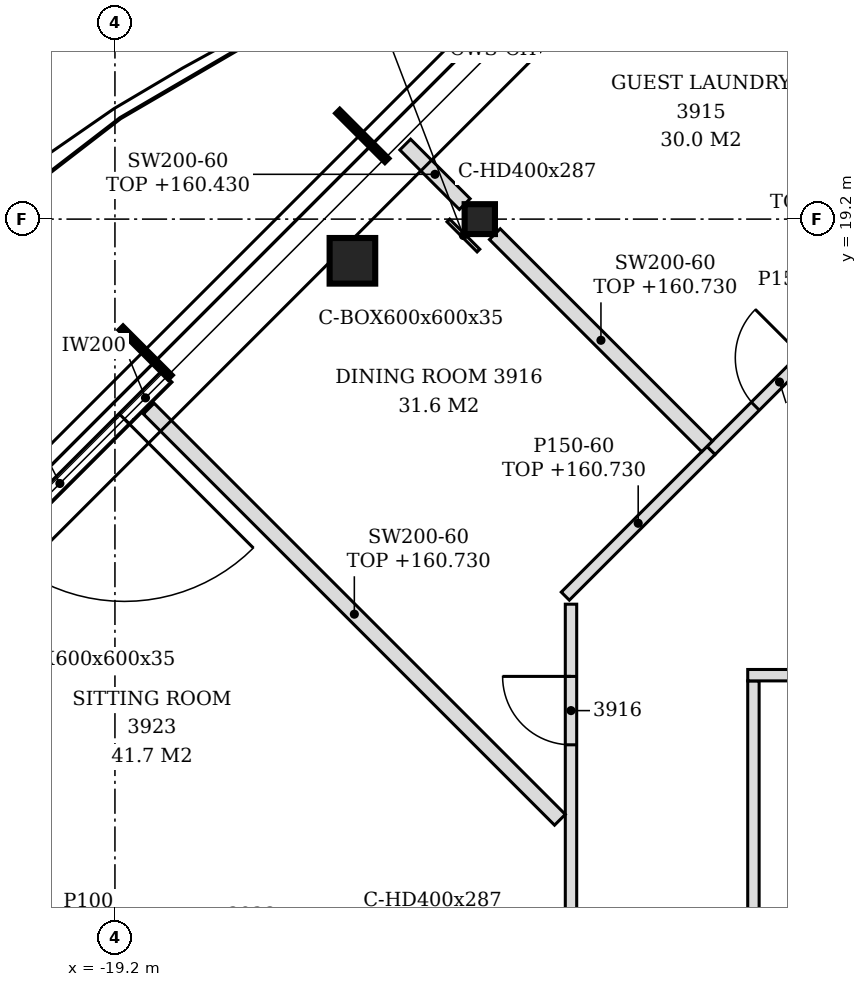
"""IFC4 building model, lengths in metres.
Left out: names, types, materials, properties, quantities, classifications, styles, units other than length and angle.
Written with IfcOpenShell. Run it as: python <this file> out.ifc"""

import sys

from ifc_helpers import new_model, si_unit, direction, frame, frame_2d, origin, origin_2d, place, context, subcontext, project, spatial, polyline, rectangle, hollow_rectangle, i_section, outline, extrude, element, fill, save


model = new_model("IFC4")
c1 = context("Model", 3, precision=1e-05, world=origin(), true_north=direction((0.0, 1.0)))
c2 = subcontext(c1, "Body", "Model", "MODEL_VIEW")
j1 = project(units=[si_unit("LENGTHUNIT", "METRE"), si_unit("PLANEANGLEUNIT", "RADIAN")], contexts=[c1])
p1 = place(None, origin())
s1 = spatial("IfcSite", under=j1, at=p1, CompositionType="ELEMENT")
p2 = place(p1, origin())
s2 = spatial("IfcBuilding", under=s1, at=p2, CompositionType="ELEMENT")
p3 = place(p2, frame((0.0, 0.0, 157.8)))
s3 = spatial("IfcBuildingStorey", under=s2, at=p3, CompositionType="ELEMENT", Elevation=157.8)
p4 = place(p3, frame((-16.076, 18.652, -0.15), z_axis=(0.0, 0.0, 1.0), x_axis=(1.0, 0.0, 0.0)))
e1 = element("IfcColumn", 1, at=p4, inside=s3, PredefinedType="COLUMN", context=c2, shape_type="SweptSolid", body=[
    extrude(hollow_rectangle(XDim=0.6, YDim=0.6, WallThickness=0.035, at=origin_2d()), origin(), (0.0, 0.0, 1.0), 3.6),
])
p5 = place(p3, frame((-14.4, 19.2, -0.15), z_axis=(0.0, 0.0, 1.0), x_axis=(1.0, 0.0, 0.0)))
e2 = element("IfcColumn", 2, at=p5, inside=s3, PredefinedType="COLUMN", context=c2, shape_type="SweptSolid", body=[
    extrude(i_section(OverallWidth=0.399, OverallDepth=0.393, WebThickness=0.023, FlangeThickness=0.037, FilletRadius=0.015, at=origin_2d()), origin(), (0.0, 0.0, 1.0), 3.6),
])
p6 = place(p3, frame((-18.521, 17.126, 0.0), z_axis=(0.0, 0.0, 1.0), x_axis=(-0.707106781187, -0.707106781187, 0.0)))
e3 = element("IfcWall", 3, at=p6, inside=s3, PredefinedType="NOTDEFINED", context=c2, shape_type="SweptSolid", body=[
    extrude(rectangle(XDim=3.962, YDim=0.2, at=frame_2d((1.981, 0.0))), origin(), (0.0, 0.0, 1.0), 3.45),
])
p7 = place(p6, frame((0.785, 0.0, 0.0)))
e4 = element("IfcOpeningElement", 4, at=p7, cuts=e3, PredefinedType="OPENING", context=c2, shape_type="SweptSolid", body=[
    extrude(rectangle(XDim=2.4, YDim=2.4, at=frame_2d((1.2, 1.2))), frame((0.0, 0.11, 0.0), z_axis=(0.0, -1.0, 0.0), x_axis=(1.0, 0.0, 0.0)), (0.0, 0.0, 1.0), 0.22),
])
p8 = place(p3, frame((-13.2, -3.5, 0.0), z_axis=(0.0, 0.0, 1.0), x_axis=(0.0, 1.0, 0.0)))
e5 = element("IfcWall", 5, at=p8, inside=s3, PredefinedType="PARTITIONING", context=c2, shape_type="SweptSolid", body=[
    extrude(outline(polyline([(0.0, 0.0), (17.634, 0.0), (17.634, 3.45), (13.2, 3.45), (13.198, 2.93), (13.0, 2.93), (12.998, 3.45), (8.4, 3.45), (8.398, 2.93), (8.2, 2.93), (8.198, 3.45), (3.6, 3.45), (3.598, 2.93), (3.4, 2.93), (3.398, 3.45), (0.0, 3.45), (0.0, 0.0)])), frame((0.0, 0.075, 0.0), z_axis=(0.0, -1.0, 0.0), x_axis=(1.0, 0.0, 0.0)), (0.0, 0.0, 1.0), 0.15),
])
p9 = place(p8, frame((15.784, 0.0, 0.0)))
e6 = element("IfcOpeningElement", 6, at=p9, cuts=e5, PredefinedType="OPENING", context=c2, shape_type="SweptSolid", body=[
    extrude(rectangle(XDim=0.9, YDim=2.1, at=frame_2d((0.45, 1.05))), frame((0.0, 0.085, 0.0), z_axis=(0.0, -1.0, 0.0), x_axis=(1.0, 0.0, 0.0)), (0.0, 0.0, 1.0), 0.17),
])
p10 = place(p8, frame((11.45, 0.0, 0.0)))
e7 = element("IfcOpeningElement", 7, at=p10, cuts=e5, PredefinedType="OPENING", context=c2, shape_type="SweptSolid", body=[
    extrude(rectangle(XDim=0.9, YDim=2.1, at=frame_2d((0.45, 1.05))), frame((0.0, 0.085, 0.0), z_axis=(0.0, -1.0, 0.0), x_axis=(1.0, 0.0, 0.0)), (0.0, 0.0, 1.0), 0.17),
])
p11 = place(p8, frame((4.25, 0.0, 0.0)))
e8 = element("IfcOpeningElement", 8, at=p11, cuts=e5, PredefinedType="OPENING", context=c2, shape_type="SweptSolid", body=[
    extrude(rectangle(XDim=0.9, YDim=2.1, at=frame_2d((0.45, 1.05))), frame((0.0, 0.085, 0.0), z_axis=(0.0, -1.0, 0.0), x_axis=(1.0, 0.0, 0.0)), (0.0, 0.0, 1.0), 0.17),
])
p12 = place(p8, frame((1.353, 0.0, 0.0)))
e9 = element("IfcOpeningElement", 9, at=p12, cuts=e5, PredefinedType="OPENING", context=c2, shape_type="SweptSolid", body=[
    extrude(rectangle(XDim=0.9, YDim=2.1, at=frame_2d((0.45, 1.05))), frame((0.0, 0.085, 0.0), z_axis=(0.0, -1.0, 0.0), x_axis=(1.0, 0.0, 0.0)), (0.0, 0.0, 1.0), 0.17),
])
p13 = place(p3, frame((-10.8, -2.506, 0.0), z_axis=(0.0, 0.0, 1.0), x_axis=(0.0, 1.0, 0.0)))
e10 = element("IfcWall", 10, at=p13, inside=s3, PredefinedType="PARTITIONING", context=c2, shape_type="SweptSolid", body=[
    extrude(outline(polyline([(0.0, 0.0), (15.631, 0.0), (15.631, 3.45), (12.206, 3.45), (12.204, 2.93), (12.006, 2.93), (12.004, 3.45), (7.406, 3.45), (7.404, 2.93), (7.206, 2.93), (7.204, 3.45), (2.606, 3.45), (2.604, 2.93), (2.406, 2.93), (2.404, 3.45), (0.0, 3.45), (0.0, 0.0)])), frame((0.0, 0.075, 0.0), z_axis=(0.0, -1.0, 0.0), x_axis=(1.0, 0.0, 0.0)), (0.0, 0.0, 1.0), 0.15),
])
p14 = place(p3, frame((-13.346, 11.298, 0.0), z_axis=(0.0, 0.0, 1.0), x_axis=(-0.707106781187, 0.707106781187, 0.0)))
e11 = element("IfcWall", 11, at=p14, inside=s3, PredefinedType="PARTITIONING", context=c2, shape_type="SweptSolid", body=[
    extrude(rectangle(XDim=7.65, YDim=0.2, at=frame_2d((3.825, 0.0))), origin(), (0.0, 0.0, 1.0), 2.93),
])
p15 = place(p3, frame((-10.875, 13.2, 0.0), z_axis=(0.0, 0.0, 1.0), x_axis=(1.0, 0.0, 0.0)))
e12 = element("IfcWall", 12, at=p15, inside=s3, PredefinedType="PARTITIONING", context=c2, shape_type="SweptSolid", body=[
    extrude(rectangle(XDim=4.06, YDim=0.15, at=frame_2d((2.03, 0.0))), origin(), (0.0, 0.0, 1.0), 3.45),
])
p16 = place(p3, frame((-13.275, 14.24, 0.0), z_axis=(0.0, 0.0, 1.0), x_axis=(0.707286821097, 0.706926695424, 0.0)))
e13 = element("IfcWall", 13, at=p16, inside=s3, PredefinedType="PARTITIONING", context=c2, shape_type="SweptSolid", body=[
    extrude(rectangle(XDim=2.712, YDim=0.15, at=frame_2d((1.356, 0.0))), origin(), (0.0, 0.0, 1.0), 2.93),
])
p17 = place(p3, frame((-11.357, 16.157, 0.0), z_axis=(0.0, 0.0, 1.0), x_axis=(0.707106781187, 0.707106781187, 0.0)))
e14 = element("IfcWall", 14, at=p17, inside=s3, PredefinedType="PARTITIONING", context=c2, shape_type="SweptSolid", body=[
    extrude(rectangle(XDim=3.071, YDim=0.15, at=frame_2d((1.535, 0.0))), origin(), (0.0, 0.0, 1.0), 3.45),
])
p18 = place(p17, frame((0.823, 0.0, 0.0)))
e15 = element("IfcOpeningElement", 15, at=p18, cuts=e14, PredefinedType="OPENING", context=c2, shape_type="SweptSolid", body=[
    extrude(rectangle(XDim=0.9, YDim=2.1, at=frame_2d((0.45, 1.05))), frame((0.0, 0.085, 0.0), z_axis=(0.0, -1.0, 0.0), x_axis=(1.0, 0.0, 0.0)), (0.0, 0.0, 1.0), 0.17),
])
p19 = place(p3, frame((-11.41, 16.21, 0.0), z_axis=(0.0, 0.0, 1.0), x_axis=(-0.707106781187, 0.707106781187, 0.0)))
e16 = element("IfcWall", 16, at=p19, inside=s3, PredefinedType="PARTITIONING", context=c2, shape_type="SweptSolid", body=[
    extrude(rectangle(XDim=3.948, YDim=0.2, at=frame_2d((1.974, 0.0))), origin(), (0.0, 0.0, 1.0), 2.93),
])
p20 = place(p3, frame((-7.522, 19.346, 0.0), z_axis=(0.0, 0.0, 1.0), x_axis=(-0.707106781187, 0.707106781187, 0.0)))
e17 = element("IfcWall", 17, at=p20, inside=s3, PredefinedType="PARTITIONING", context=c2, shape_type="SweptSolid", body=[
    extrude(rectangle(XDim=5.134, YDim=0.2, at=frame_2d((2.567, 0.0))), origin(), (0.0, 0.0, 1.0), 2.93),
])
p21 = place(p3, frame((-14.598, 19.398, 0.0), z_axis=(0.0, 0.0, 1.0), x_axis=(-0.707106781187, 0.707106781187, 0.0)))
e18 = element("IfcWall", 18, at=p21, inside=s3, PredefinedType="PARTITIONING", context=c2, shape_type="SweptSolid", body=[
    extrude(rectangle(XDim=1.107, YDim=0.2, at=frame_2d((0.554, 0.0))), origin(), (0.0, 0.0, 1.0), 2.63),
])
p22 = place(p3, frame((-14.418, 18.786, 0.0), z_axis=(0.0, 0.0, 1.0), x_axis=(-0.707106781187, 0.707106781187, 0.0)))
e19 = element("IfcWall", 19, at=p22, inside=s3, PredefinedType="PARTITIONING", context=c2, shape_type="SweptSolid", body=[
    extrude(rectangle(XDim=0.56, YDim=0.05, at=frame_2d((0.28, 0.0))), origin(), (0.0, 0.0, 1.0), 2.93),
])
p23 = place(p7, origin())
e20 = element("IfcDoor", 20, at=p23, inside=s3, OperationType="SINGLE_SWING_LEFT", PredefinedType="DOOR", context=c2, shape_type="SweptSolid", body=[
    extrude(rectangle(XDim=2.4, YDim=2.4, at=frame_2d((1.2, 1.2))), frame((0.0, 0.025, 0.0), z_axis=(0.0, -1.0, 0.0), x_axis=(1.0, 0.0, 0.0)), (0.0, 0.0, 1.0), 0.05),
])
fill(e4, e20)
p24 = place(p18, origin())
e21 = element("IfcDoor", 21, at=p24, inside=s3, OperationType="SINGLE_SWING_RIGHT", PredefinedType="DOOR", context=c2, shape_type="SweptSolid", body=[
    extrude(rectangle(XDim=0.9, YDim=2.1, at=frame_2d((0.45, 1.05))), frame((0.0, 0.025, 0.0), z_axis=(0.0, -1.0, 0.0), x_axis=(1.0, 0.0, 0.0)), (0.0, 0.0, 1.0), 0.05),
])
fill(e15, e21)
p25 = place(p9, origin())
e22 = element("IfcDoor", 22, at=p25, inside=s3, OperationType="SINGLE_SWING_RIGHT", PredefinedType="DOOR", context=c2, shape_type="SweptSolid", body=[
    extrude(rectangle(XDim=0.9, YDim=2.1, at=frame_2d((0.45, 1.05))), frame((0.0, 0.025, 0.0), z_axis=(0.0, -1.0, 0.0), x_axis=(1.0, 0.0, 0.0)), (0.0, 0.0, 1.0), 0.05),
])
fill(e6, e22)
save(model, sys.argv[1])
